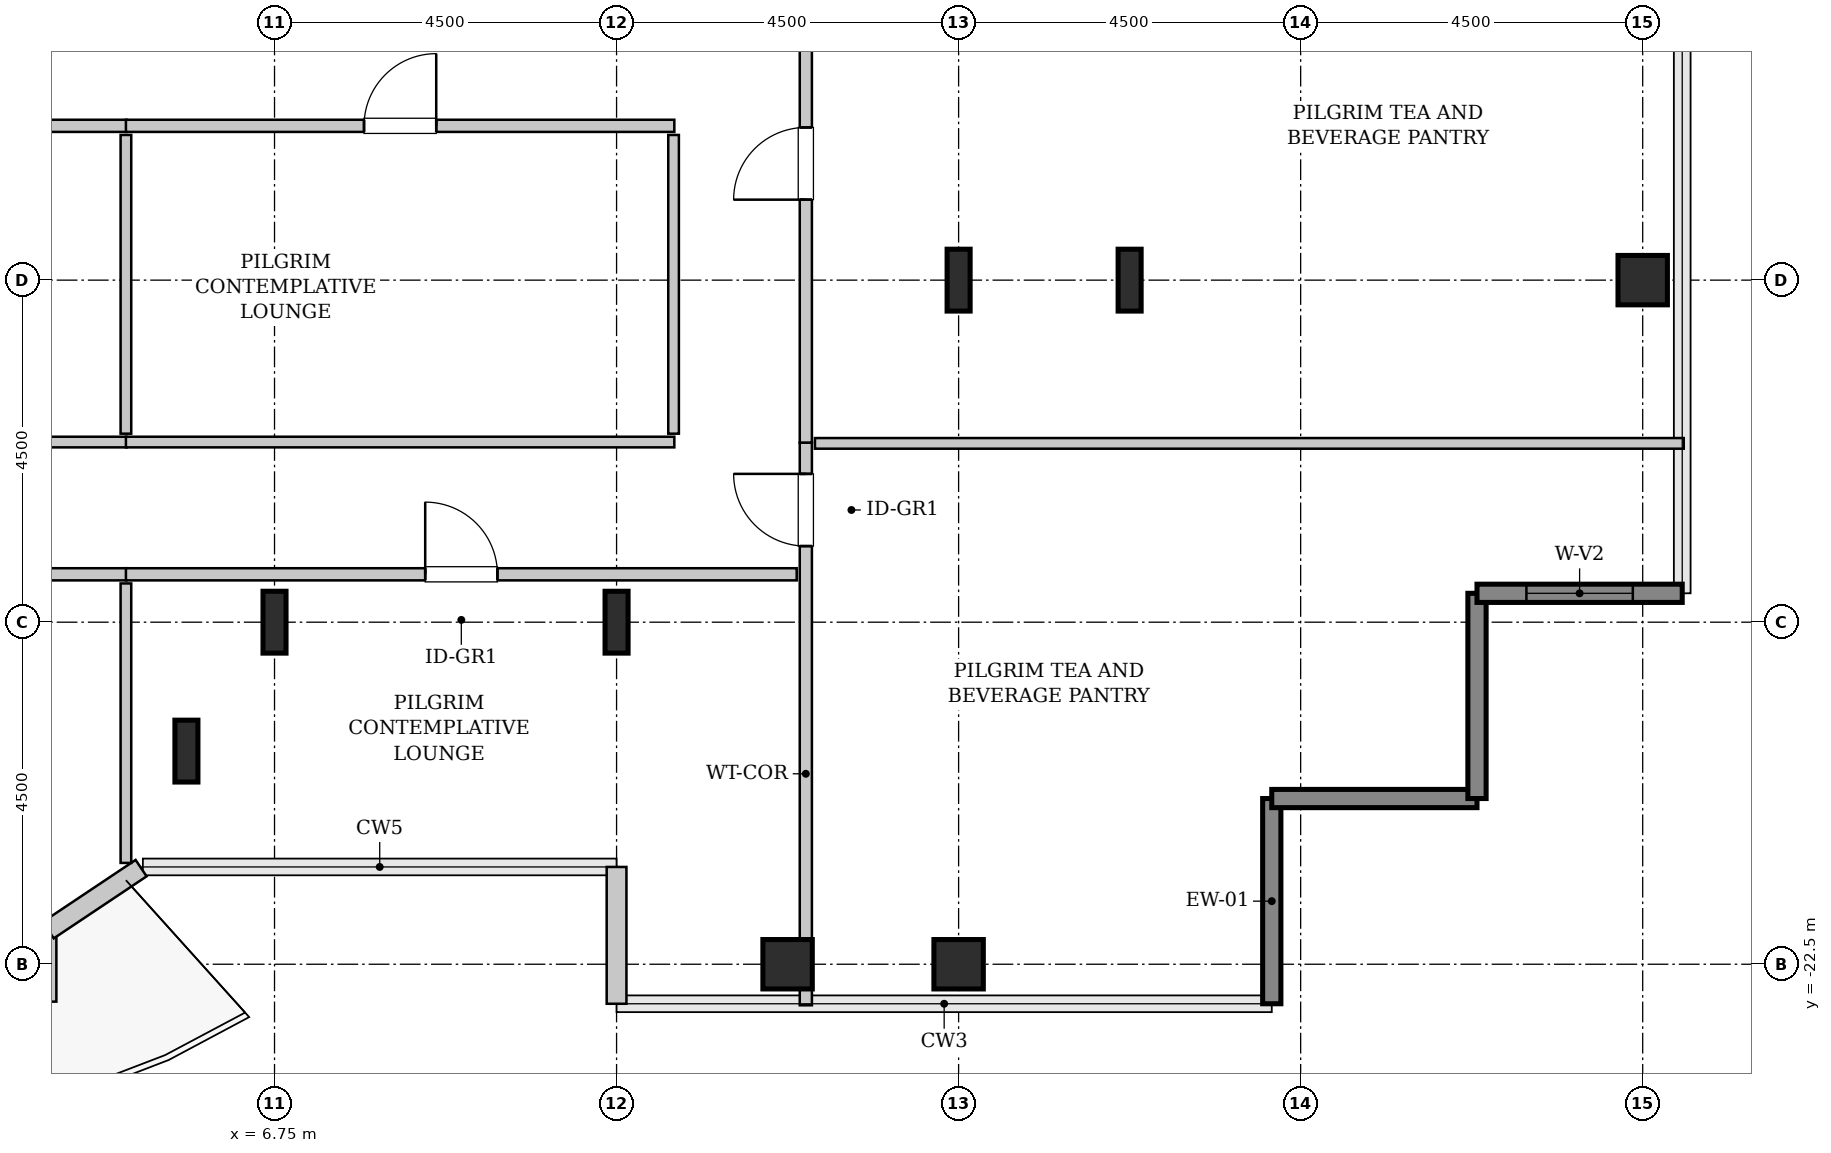
"""IFC4 building model, lengths in metres.
Left out: names, types, materials, properties, quantities, classifications, styles, units other than length and angle.
Written with IfcOpenShell. Run it as: python <this file> out.ifc"""

import sys

from ifc_helpers import new_model, si_unit, direction, frame, frame_2d, origin, origin_2d, place, context, subcontext, project, spatial, rectangle, hollow_rectangle, i_section, extrude, source, transform, mapped, element, fill, save


model = new_model("IFC4")
c1 = context("Model", 3, precision=1e-05, world=origin(), true_north=direction((0.0, 1.0)))
c2 = subcontext(c1, "Body", "Model", "MODEL_VIEW")
j1 = project(units=[si_unit("LENGTHUNIT", "METRE"), si_unit("PLANEANGLEUNIT", "RADIAN")], contexts=[c1])
p1 = place(None, origin())
s1 = spatial("IfcSite", under=j1, at=p1, CompositionType="ELEMENT")
p2 = place(p1, origin())
s2 = spatial("IfcBuilding", under=s1, at=p2, CompositionType="ELEMENT")
p3 = place(p2, frame((0.0, 0.0, 248.4)))
s3 = spatial("IfcBuildingStorey", under=s2, at=p3, CompositionType="ELEMENT", Elevation=248.4)
m1 = source(origin(), c2, "Body", "SweptSolid", [
    extrude(i_section(OverallWidth=0.303, OverallDepth=0.814, WebThickness=0.021, FlangeThickness=0.04, FilletRadius=0.03, at=origin_2d()), origin(), (0.0, 0.0, 1.0), 3.8),
])
for number, where, z_axis, x_axis in (
    (1, (5.591, -19.696, 0.0), (0.0, 0.0, 1.0), (1.0, 0.0, 0.0)),
    (2, (6.75, -18.0, 0.0), (0.0, 0.0, 1.0), (1.0, 0.0, 0.0)),
    (3, (11.25, -18.0, 0.0), (0.0, 0.0, 1.0), (1.0, 0.0, 0.0)),
):
    element("IfcColumn", number, at=place(p3, frame(where, z_axis=z_axis, x_axis=x_axis)), inside=s3, PredefinedType="COLUMN", context=c2, shape_type="MappedRepresentation", body=[
        mapped(m1, transform((0.0, 0.0, 0.0), x_axis=(1.0, 0.0, 0.0), y_axis=(0.0, 1.0, 0.0), z_axis=(0.0, 0.0, 1.0), scale=1.0)),
    ])
m2 = source(origin(), c2, "Body", "SweptSolid", [
    extrude(hollow_rectangle(XDim=0.65, YDim=0.65, WallThickness=0.032, InnerFilletRadius=0.032, OuterFilletRadius=0.064, at=origin_2d()), origin(), (0.0, 0.0, 1.0), 3.8),
])
for number, where, z_axis, x_axis in (
    (4, (13.5, -22.5, 0.0), (0.0, 0.0, 1.0), (1.0, 0.0, 0.0)),
    (5, (15.75, -22.5, 0.0), (0.0, 0.0, 1.0), (1.0, 0.0, 0.0)),
):
    element("IfcColumn", number, at=place(p3, frame(where, z_axis=z_axis, x_axis=x_axis)), inside=s3, PredefinedType="COLUMN", context=c2, shape_type="MappedRepresentation", body=[
        mapped(m2, transform((0.0, 0.0, 0.0), x_axis=(1.0, 0.0, 0.0), y_axis=(0.0, 1.0, 0.0), z_axis=(0.0, 0.0, 1.0), scale=1.0)),
    ])
for number, where, z_axis, x_axis in (
    (6, (15.75, -13.5, 0.0), (0.0, 0.0, 1.0), (1.0, 0.0, 0.0)),
    (7, (18.0, -13.5, 0.0), (0.0, 0.0, 1.0), (1.0, 0.0, 0.0)),
):
    element("IfcColumn", number, at=place(p3, frame(where, z_axis=z_axis, x_axis=x_axis)), inside=s3, PredefinedType="COLUMN", context=c2, shape_type="MappedRepresentation", body=[
        mapped(m1, transform((0.0, 0.0, 0.0), x_axis=(1.0, 0.0, 0.0), y_axis=(0.0, 1.0, 0.0), z_axis=(0.0, 0.0, 1.0), scale=1.0)),
    ])
p4 = place(p3, frame((24.75, -13.5, 0.0), z_axis=(0.0, 0.0, 1.0), x_axis=(1.0, 0.0, 0.0)))
e8 = element("IfcColumn", 8, at=p4, inside=s3, PredefinedType="COLUMN", context=c2, shape_type="MappedRepresentation", body=[
    mapped(m2, transform((0.0, 0.0, 0.0), x_axis=(1.0, 0.0, 0.0), y_axis=(0.0, 1.0, 0.0), z_axis=(0.0, 0.0, 1.0), scale=1.0)),
])
m3 = source(origin(), c2, "Body", "SweptSolid", [
    extrude(rectangle(XDim=1.8, YDim=0.26, at=frame_2d((0.9, 0.0))), origin(), (0.0, 0.0, 1.0), 3.55),
])
p5 = place(p3, frame((11.25, -21.22, 0.0), z_axis=(0.0, 0.0, 1.0), x_axis=(0.0, -1.0, 0.0)))
e9 = element("IfcWall", 9, at=p5, inside=s3, PredefinedType="SOLIDWALL", context=c2, shape_type="MappedRepresentation", body=[
    mapped(m3, transform((0.0, 0.0, 0.0), x_axis=(1.0, 0.0, 0.0), y_axis=(0.0, 1.0, 0.0), z_axis=(0.0, 0.0, 1.0), scale=1.0)),
])
m4 = source(origin(), c2, "Body", "SweptSolid", [
    extrude(rectangle(XDim=2.7, YDim=0.24, at=frame_2d((1.35, 0.0))), origin(), (0.0, 0.0, 1.0), 3.55),
])
for number, where, z_axis, x_axis in (
    (10, (19.87, -23.02, 0.0), (0.0, 0.0, 1.0), (0.0, 1.0, 0.0)),
    (11, (19.87, -20.32, 0.0), (0.0, 0.0, 1.0), (1.0, 0.0, 0.0)),
    (12, (22.57, -20.32, 0.0), (0.0, 0.0, 1.0), (0.0, 1.0, 0.0)),
):
    element("IfcWall", number, at=place(p3, frame(where, z_axis=z_axis, x_axis=x_axis)), inside=s3, PredefinedType="SHEAR", context=c2, shape_type="MappedRepresentation", body=[
        mapped(m4, transform((0.0, 0.0, 0.0), x_axis=(1.0, 0.0, 0.0), y_axis=(0.0, 1.0, 0.0), z_axis=(0.0, 0.0, 1.0), scale=1.0)),
    ])
p6 = place(p3, frame((22.57, -17.62, 0.0), z_axis=(0.0, 0.0, 1.0), x_axis=(1.0, 0.0, 0.0)))
e13 = element("IfcWall", 13, at=p6, inside=s3, PredefinedType="SHEAR", context=c2, shape_type="MappedRepresentation", body=[
    mapped(m4, transform((0.0, 0.0, 0.0), x_axis=(1.0, 0.0, 0.0), y_axis=(0.0, 1.0, 0.0), z_axis=(0.0, 0.0, 1.0), scale=1.0)),
])
p7 = place(p6, frame((0.65, 0.0, 0.85)))
e14 = element("IfcOpeningElement", 14, at=p7, cuts=e13, PredefinedType="OPENING", context=c2, shape_type="SweptSolid", body=[
    extrude(rectangle(XDim=1.4, YDim=1.8, at=frame_2d((0.7, 0.9))), frame((0.0, 0.13, 0.0), z_axis=(0.0, -1.0, 0.0), x_axis=(1.0, 0.0, 0.0)), (0.0, 0.0, 1.0), 0.26),
])
m5 = source(origin(), c2, "Body", "SweptSolid", [
    extrude(rectangle(XDim=0.897, YDim=0.26, at=frame_2d((0.448, 0.0))), origin(), (0.0, 0.0, 1.0), 3.55),
])
p8 = place(p3, frame((3.75, -22.992, 0.0), z_axis=(0.0, 0.0, 1.0), x_axis=(0.0, 1.0, 0.0)))
e15 = element("IfcWall", 15, at=p8, inside=s3, PredefinedType="SOLIDWALL", context=c2, shape_type="MappedRepresentation", body=[
    mapped(m5, transform((0.0, 0.0, 0.0), x_axis=(1.0, 0.0, 0.0), y_axis=(0.0, 1.0, 0.0), z_axis=(0.0, 0.0, 1.0), scale=1.0)),
])
m6 = source(origin(), c2, "Body", "SweptSolid", [
    extrude(rectangle(XDim=1.469, YDim=0.26, at=frame_2d((0.734, 0.0))), origin(), (0.0, 0.0, 1.0), 3.55),
])
p9 = place(p3, frame((3.773, -22.052, 0.0), z_axis=(0.0, 0.0, 1.0), x_axis=(0.831461760506, 0.555581983884, 0.0)))
e16 = element("IfcWall", 16, at=p9, inside=s3, PredefinedType="SOLIDWALL", context=c2, shape_type="MappedRepresentation", body=[
    mapped(m6, transform((0.0, 0.0, 0.0), x_axis=(1.0, 0.0, 0.0), y_axis=(0.0, 1.0, 0.0), z_axis=(0.0, 0.0, 1.0), scale=1.0)),
])
m7 = source(origin(), c2, "Body", "SweptSolid", [
    extrude(rectangle(XDim=7.403, YDim=0.16, at=frame_2d((3.701, 0.0))), origin(), (0.0, 0.0, 1.0), 3.535),
])
p10 = place(p3, frame((13.74, -23.04, 0.0), z_axis=(0.0, 0.0, 1.0), x_axis=(0.0, 1.0, 0.0)))
e17 = element("IfcWall", 17, at=p10, inside=s3, PredefinedType="PARTITIONING", context=c2, shape_type="MappedRepresentation", body=[
    mapped(m7, transform((0.0, 0.0, 0.0), x_axis=(1.0, 0.0, 0.0), y_axis=(0.0, 1.0, 0.0), z_axis=(0.0, 0.0, 1.0), scale=1.0)),
])
p11 = place(p10, frame((6.041, 0.0, 0.0)))
e18 = element("IfcOpeningElement", 18, at=p11, cuts=e17, PredefinedType="OPENING", context=c2, shape_type="SweptSolid", body=[
    extrude(rectangle(XDim=0.95, YDim=2.1, at=frame_2d((0.475, 1.05))), frame((0.0, 0.09, 0.0), z_axis=(0.0, -1.0, 0.0), x_axis=(1.0, 0.0, 0.0)), (0.0, 0.0, 1.0), 0.18),
])
m8 = source(origin(), c2, "Body", "SweptSolid", [
    extrude(rectangle(XDim=11.43, YDim=0.14, at=frame_2d((5.715, 0.0))), origin(), (0.0, 0.0, 1.0), 3.535),
])
p12 = place(p3, frame((13.86, -15.647, 0.0), z_axis=(0.0, 0.0, 1.0), x_axis=(1.0, 0.0, 0.0)))
e19 = element("IfcWall", 19, at=p12, inside=s3, PredefinedType="PARTITIONING", context=c2, shape_type="MappedRepresentation", body=[
    mapped(m8, transform((0.0, 0.0, 0.0), x_axis=(1.0, 0.0, 0.0), y_axis=(0.0, 1.0, 0.0), z_axis=(0.0, 0.0, 1.0), scale=1.0)),
])
m9 = source(origin(), c2, "Body", "SweptSolid", [
    extrude(rectangle(XDim=7.343, YDim=0.16, at=frame_2d((3.671, 0.0))), origin(), (0.0, 0.0, 1.0), 3.535),
])
p13 = place(p3, frame((13.74, -15.637, 0.0), z_axis=(0.0, 0.0, 1.0), x_axis=(0.0, 1.0, 0.0)))
e20 = element("IfcWall", 20, at=p13, inside=s3, PredefinedType="PARTITIONING", context=c2, shape_type="MappedRepresentation", body=[
    mapped(m9, transform((0.0, 0.0, 0.0), x_axis=(1.0, 0.0, 0.0), y_axis=(0.0, 1.0, 0.0), z_axis=(0.0, 0.0, 1.0), scale=1.0)),
])
p14 = place(p13, frame((3.196, 0.0, 0.0)))
e21 = element("IfcOpeningElement", 21, at=p14, cuts=e20, PredefinedType="OPENING", context=c2, shape_type="SweptSolid", body=[
    extrude(rectangle(XDim=0.95, YDim=2.1, at=frame_2d((0.475, 1.05))), frame((0.0, 0.09, 0.0), z_axis=(0.0, -1.0, 0.0), x_axis=(1.0, 0.0, 0.0)), (0.0, 0.0, 1.0), 0.18),
])
m10 = source(origin(), c2, "Body", "SweptSolid", [
    extrude(rectangle(XDim=12.21, YDim=0.16, at=frame_2d((6.105, 0.0))), origin(), (0.0, 0.0, 1.0), 3.535),
])
p15 = place(p3, frame((-7.405, -17.37, 0.0), z_axis=(0.0, 0.0, 1.0), x_axis=(1.0, 0.0, 0.0)))
e22 = element("IfcWall", 22, at=p15, inside=s3, PredefinedType="PARTITIONING", context=c2, shape_type="MappedRepresentation", body=[
    mapped(m10, transform((0.0, 0.0, 0.0), x_axis=(1.0, 0.0, 0.0), y_axis=(0.0, 1.0, 0.0), z_axis=(0.0, 0.0, 1.0), scale=1.0)),
])
p16 = place(p15, frame((5.63, 0.0, 0.0)))
e23 = element("IfcOpeningElement", 23, at=p16, cuts=e22, PredefinedType="OPENING", context=c2, shape_type="SweptSolid", body=[
    extrude(rectangle(XDim=0.95, YDim=2.1, at=frame_2d((0.475, 1.05))), frame((0.0, 0.09, 0.0), z_axis=(0.0, -1.0, 0.0), x_axis=(1.0, 0.0, 0.0)), (0.0, 0.0, 1.0), 0.18),
])
m11 = source(origin(), c2, "Body", "SweptSolid", [
    extrude(rectangle(XDim=3.677, YDim=0.14, at=frame_2d((1.838, 0.0))), origin(), (0.0, 0.0, 1.0), 3.535),
])
p17 = place(p3, frame((4.795, -21.167, 0.0), z_axis=(0.0, 0.0, 1.0), x_axis=(0.0, 1.0, 0.0)))
e24 = element("IfcWall", 24, at=p17, inside=s3, PredefinedType="PARTITIONING", context=c2, shape_type="MappedRepresentation", body=[
    mapped(m11, transform((0.0, 0.0, 0.0), x_axis=(1.0, 0.0, 0.0), y_axis=(0.0, 1.0, 0.0), z_axis=(0.0, 0.0, 1.0), scale=1.0)),
])
p18 = place(p3, frame((-7.405, -11.47, 0.0), z_axis=(0.0, 0.0, 1.0), x_axis=(1.0, 0.0, 0.0)))
e25 = element("IfcWall", 25, at=p18, inside=s3, PredefinedType="PARTITIONING", context=c2, shape_type="MappedRepresentation", body=[
    mapped(m10, transform((0.0, 0.0, 0.0), x_axis=(1.0, 0.0, 0.0), y_axis=(0.0, 1.0, 0.0), z_axis=(0.0, 0.0, 1.0), scale=1.0)),
])
p19 = place(p18, frame((5.63, 0.0, 0.0)))
e26 = element("IfcOpeningElement", 26, at=p19, cuts=e25, PredefinedType="OPENING", context=c2, shape_type="SweptSolid", body=[
    extrude(rectangle(XDim=0.95, YDim=2.1, at=frame_2d((0.475, 1.05))), frame((0.0, 0.09, 0.0), z_axis=(0.0, -1.0, 0.0), x_axis=(1.0, 0.0, 0.0)), (0.0, 0.0, 1.0), 0.18),
])
m12 = source(origin(), c2, "Body", "SweptSolid", [
    extrude(rectangle(XDim=12.21, YDim=0.14, at=frame_2d((6.105, 0.0))), origin(), (0.0, 0.0, 1.0), 3.535),
])
p20 = place(p3, frame((-7.405, -15.63, 0.0), z_axis=(0.0, 0.0, 1.0), x_axis=(1.0, 0.0, 0.0)))
e27 = element("IfcWall", 27, at=p20, inside=s3, PredefinedType="PARTITIONING", context=c2, shape_type="MappedRepresentation", body=[
    mapped(m12, transform((0.0, 0.0, 0.0), x_axis=(1.0, 0.0, 0.0), y_axis=(0.0, 1.0, 0.0), z_axis=(0.0, 0.0, 1.0), scale=1.0)),
])
m13 = source(origin(), c2, "Body", "SweptSolid", [
    extrude(rectangle(XDim=3.93, YDim=0.14, at=frame_2d((1.965, 0.0))), origin(), (0.0, 0.0, 1.0), 3.535),
])
p21 = place(p3, frame((4.795, -15.52, 0.0), z_axis=(0.0, 0.0, 1.0), x_axis=(0.0, 1.0, 0.0)))
e28 = element("IfcWall", 28, at=p21, inside=s3, PredefinedType="PARTITIONING", context=c2, shape_type="MappedRepresentation", body=[
    mapped(m13, transform((0.0, 0.0, 0.0), x_axis=(1.0, 0.0, 0.0), y_axis=(0.0, 1.0, 0.0), z_axis=(0.0, 0.0, 1.0), scale=1.0)),
])
m14 = source(origin(), c2, "Body", "SweptSolid", [
    extrude(rectangle(XDim=8.825, YDim=0.16, at=frame_2d((4.413, 0.0))), origin(), (0.0, 0.0, 1.0), 3.535),
])
p22 = place(p3, frame((4.795, -17.37, 0.0), z_axis=(0.0, 0.0, 1.0), x_axis=(1.0, 0.0, 0.0)))
e29 = element("IfcWall", 29, at=p22, inside=s3, PredefinedType="PARTITIONING", context=c2, shape_type="MappedRepresentation", body=[
    mapped(m14, transform((0.0, 0.0, 0.0), x_axis=(1.0, 0.0, 0.0), y_axis=(0.0, 1.0, 0.0), z_axis=(0.0, 0.0, 1.0), scale=1.0)),
])
p23 = place(p22, frame((3.938, 0.0, 0.0)))
e30 = element("IfcOpeningElement", 30, at=p23, cuts=e29, PredefinedType="OPENING", context=c2, shape_type="SweptSolid", body=[
    extrude(rectangle(XDim=0.95, YDim=2.1, at=frame_2d((0.475, 1.05))), frame((0.0, 0.09, 0.0), z_axis=(0.0, -1.0, 0.0), x_axis=(1.0, 0.0, 0.0)), (0.0, 0.0, 1.0), 0.18),
])
m15 = source(origin(), c2, "Body", "SweptSolid", [
    extrude(rectangle(XDim=7.215, YDim=0.16, at=frame_2d((3.607, 0.0))), origin(), (0.0, 0.0, 1.0), 3.535),
])
p24 = place(p3, frame((4.795, -11.47, 0.0), z_axis=(0.0, 0.0, 1.0), x_axis=(1.0, 0.0, 0.0)))
e31 = element("IfcWall", 31, at=p24, inside=s3, PredefinedType="PARTITIONING", context=c2, shape_type="MappedRepresentation", body=[
    mapped(m15, transform((0.0, 0.0, 0.0), x_axis=(1.0, 0.0, 0.0), y_axis=(0.0, 1.0, 0.0), z_axis=(0.0, 0.0, 1.0), scale=1.0)),
])
p25 = place(p24, frame((3.133, 0.0, 0.0)))
e32 = element("IfcOpeningElement", 32, at=p25, cuts=e31, PredefinedType="OPENING", context=c2, shape_type="SweptSolid", body=[
    extrude(rectangle(XDim=0.95, YDim=2.1, at=frame_2d((0.475, 1.05))), frame((0.0, 0.09, 0.0), z_axis=(0.0, -1.0, 0.0), x_axis=(1.0, 0.0, 0.0)), (0.0, 0.0, 1.0), 0.18),
])
m16 = source(origin(), c2, "Body", "SweptSolid", [
    extrude(rectangle(XDim=7.215, YDim=0.14, at=frame_2d((3.607, 0.0))), origin(), (0.0, 0.0, 1.0), 3.535),
])
p26 = place(p3, frame((4.795, -15.63, 0.0), z_axis=(0.0, 0.0, 1.0), x_axis=(1.0, 0.0, 0.0)))
e33 = element("IfcWall", 33, at=p26, inside=s3, PredefinedType="PARTITIONING", context=c2, shape_type="MappedRepresentation", body=[
    mapped(m16, transform((0.0, 0.0, 0.0), x_axis=(1.0, 0.0, 0.0), y_axis=(0.0, 1.0, 0.0), z_axis=(0.0, 0.0, 1.0), scale=1.0)),
])
p27 = place(p3, frame((12.0, -15.52, 0.0), z_axis=(0.0, 0.0, 1.0), x_axis=(0.0, 1.0, 0.0)))
e34 = element("IfcWall", 34, at=p27, inside=s3, PredefinedType="PARTITIONING", context=c2, shape_type="MappedRepresentation", body=[
    mapped(m13, transform((0.0, 0.0, 0.0), x_axis=(1.0, 0.0, 0.0), y_axis=(0.0, 1.0, 0.0), z_axis=(0.0, 0.0, 1.0), scale=1.0)),
])
m17 = source(origin(), c2, "Body", "SweptSolid", [
    extrude(rectangle(XDim=1.4, YDim=1.8, at=frame_2d((0.7, 0.9))), frame((0.0, 0.03, 0.0), z_axis=(0.0, -1.0, 0.0), x_axis=(1.0, 0.0, 0.0)), (0.0, 0.0, 1.0), 0.06),
])
p28 = place(p7, origin())
e35 = element("IfcWindow", 35, at=p28, inside=s3, PartitioningType="SINGLE_PANEL", PredefinedType="WINDOW", context=c2, shape_type="MappedRepresentation", body=[
    mapped(m17, transform((0.0, 0.0, 0.0), x_axis=(1.0, 0.0, 0.0), y_axis=(0.0, 1.0, 0.0), z_axis=(0.0, 0.0, 1.0), scale=1.0)),
])
fill(e14, e35)
m18 = source(origin(), c2, "Body", "SweptSolid", [
    extrude(rectangle(XDim=0.95, YDim=2.1, at=frame_2d((0.475, 1.05))), frame((0.0, 0.025, 0.0), z_axis=(0.0, -1.0, 0.0), x_axis=(1.0, 0.0, 0.0)), (0.0, 0.0, 1.0), 0.05),
])
p29 = place(p11, origin())
e36 = element("IfcDoor", 36, at=p29, inside=s3, OperationType="SINGLE_SWING_RIGHT", PredefinedType="DOOR", context=c2, shape_type="MappedRepresentation", body=[
    mapped(m18, transform((0.0, 0.0, 0.0), x_axis=(1.0, 0.0, 0.0), y_axis=(0.0, 1.0, 0.0), z_axis=(0.0, 0.0, 1.0), scale=1.0)),
])
fill(e18, e36)
p30 = place(p14, origin())
e37 = element("IfcDoor", 37, at=p30, inside=s3, OperationType="SINGLE_SWING_LEFT", PredefinedType="DOOR", context=c2, shape_type="MappedRepresentation", body=[
    mapped(m18, transform((0.0, 0.0, 0.0), x_axis=(1.0, 0.0, 0.0), y_axis=(0.0, 1.0, 0.0), z_axis=(0.0, 0.0, 1.0), scale=1.0)),
])
fill(e21, e37)
p31 = place(p23, origin())
e38 = element("IfcDoor", 38, at=p31, inside=s3, OperationType="SINGLE_SWING_LEFT", PredefinedType="DOOR", context=c2, shape_type="MappedRepresentation", body=[
    mapped(m18, transform((0.0, 0.0, 0.0), x_axis=(1.0, 0.0, 0.0), y_axis=(0.0, 1.0, 0.0), z_axis=(0.0, 0.0, 1.0), scale=1.0)),
])
fill(e30, e38)
p32 = place(p25, origin())
e39 = element("IfcDoor", 39, at=p32, inside=s3, OperationType="SINGLE_SWING_RIGHT", PredefinedType="DOOR", context=c2, shape_type="MappedRepresentation", body=[
    mapped(m18, transform((0.0, 0.0, 0.0), x_axis=(1.0, 0.0, 0.0), y_axis=(0.0, 1.0, 0.0), z_axis=(0.0, 0.0, 1.0), scale=1.0)),
])
fill(e32, e39)
save(model, sys.argv[1])
